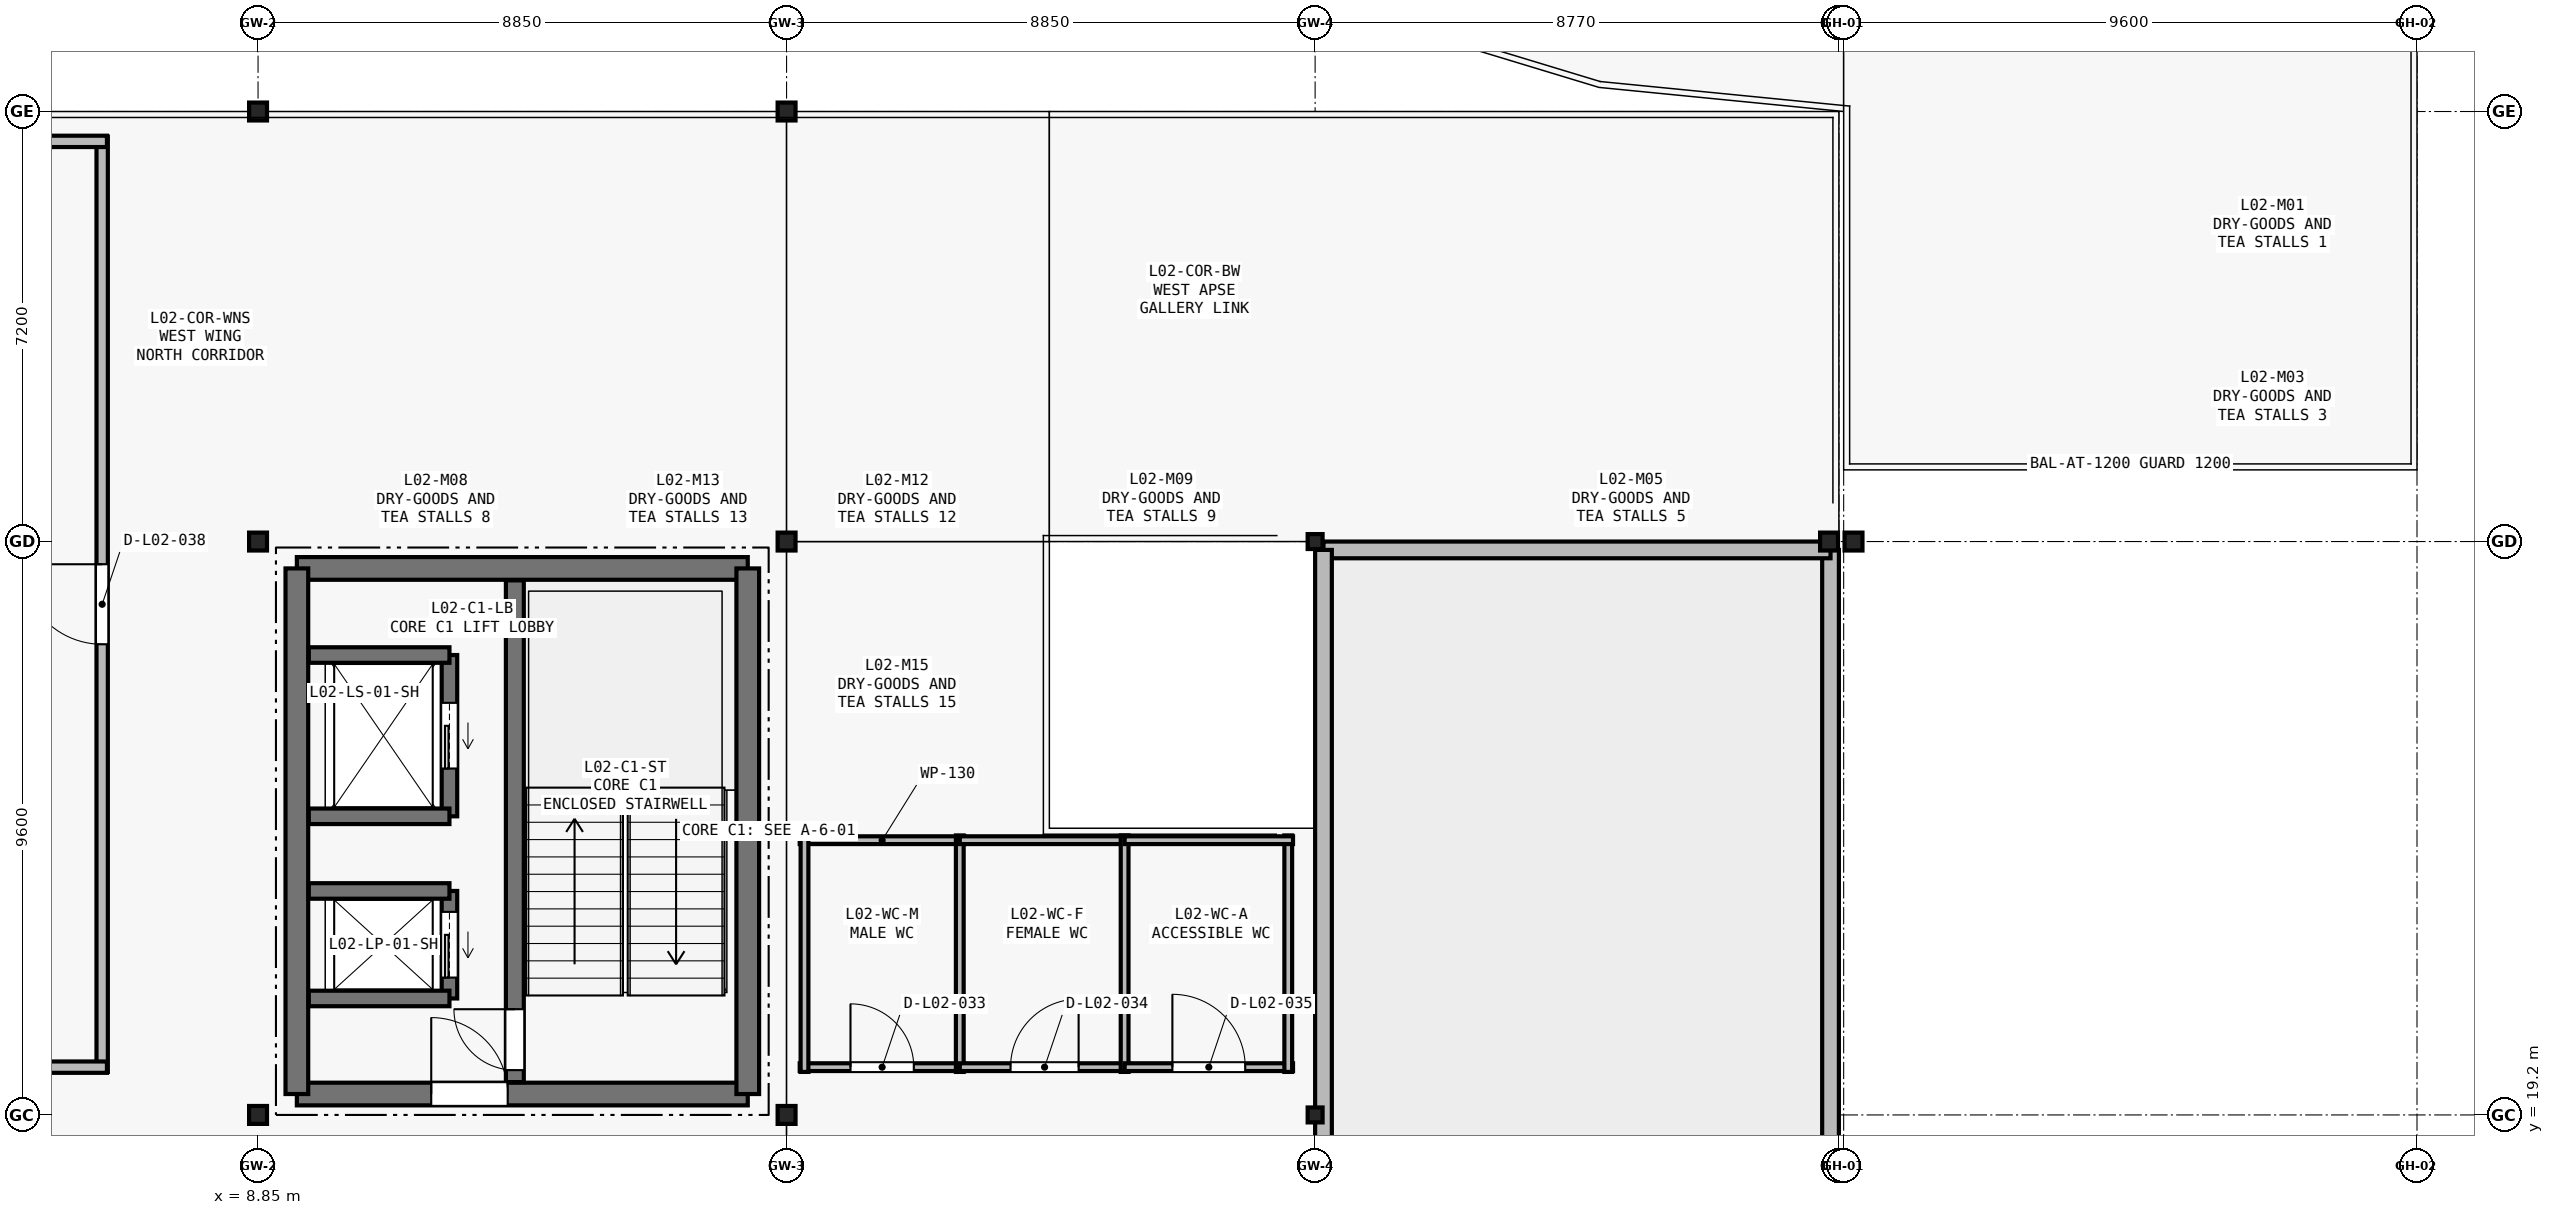
"""IFC4 building model, lengths in metres.
Left out: names, types, materials, properties, quantities, classifications, styles, units other than length and angle.
Written with IfcOpenShell. Run it as: python <this file> out.ifc"""

import sys

from ifc_helpers import new_model, si_unit, direction, frame, frame_2d, origin, origin_2d, place, context, subcontext, project, spatial, rectangle, i_section, extrude, element, fill, save


model = new_model("IFC4")
c1 = context("Model", 3, precision=1e-05, world=origin(), true_north=direction((0.0, 1.0)))
c2 = subcontext(c1, "Body", "Model", "MODEL_VIEW")
j1 = project(units=[si_unit("LENGTHUNIT", "METRE"), si_unit("PLANEANGLEUNIT", "RADIAN")], contexts=[c1])
p1 = place(None, origin())
s1 = spatial("IfcSite", under=j1, at=p1, CompositionType="ELEMENT")
p2 = place(p1, origin())
s2 = spatial("IfcBuilding", under=s1, at=p2, CompositionType="ELEMENT")
p3 = place(p2, frame((0.0, 0.0, 10.8)))
s3 = spatial("IfcBuildingStorey", under=s2, at=p3, CompositionType="ELEMENT", Elevation=10.8)
for number, where, z_axis, x_axis in (
    (1, (8.85, 19.2, 0.0), (0.0, 0.0, 1.0), (1.0, 0.0, 0.0)),
    (2, (8.85, 28.8, 0.0), (0.0, 0.0, 1.0), (1.0, 0.0, 0.0)),
    (3, (8.85, 36.0, 0.0), (0.0, 0.0, 1.0), (1.0, 0.0, 0.0)),
    (4, (17.7, 19.2, 0.0), (0.0, 0.0, 1.0), (1.0, 0.0, 0.0)),
    (5, (17.7, 28.8, 0.0), (0.0, 0.0, 1.0), (1.0, 0.0, 0.0)),
    (6, (17.7, 36.0, 0.0), (0.0, 0.0, 1.0), (1.0, 0.0, 0.0)),
):
    element("IfcColumn", number, at=place(p3, frame(where, z_axis=z_axis, x_axis=x_axis)), inside=s3, PredefinedType="COLUMN", context=c2, shape_type="SweptSolid", body=[
        extrude(i_section(OverallWidth=0.3, OverallDepth=0.3, WebThickness=0.01, FlangeThickness=0.015, FilletRadius=0.018, at=origin_2d()), origin(), (0.0, 0.0, 1.0), 4.2),
    ])
for number, where, z_axis, x_axis in (
    (7, (26.55, 19.2, 0.0), (0.0, 0.0, 1.0), (1.0, 0.0, 0.0)),
    (8, (26.55, 28.8, 0.0), (0.0, 0.0, 1.0), (1.0, 0.0, 0.0)),
):
    element("IfcColumn", number, at=place(p3, frame(where, z_axis=z_axis, x_axis=x_axis)), inside=s3, PredefinedType="COLUMN", context=c2, shape_type="SweptSolid", body=[
        extrude(i_section(OverallWidth=0.25, OverallDepth=0.25, WebThickness=0.009, FlangeThickness=0.014, FilletRadius=0.016, at=origin_2d()), origin(), (0.0, 0.0, 1.0), 4.2),
    ])
for number, where, z_axis, x_axis in (
    (9, (35.155, 28.8, 0.0), (0.0, 0.0, 1.0), (1.0, 0.0, 0.0)),
    (10, (35.565, 28.8, 0.0), (0.0, 0.0, 1.0), (1.0, 0.0, 0.0)),
):
    element("IfcColumn", number, at=place(p3, frame(where, z_axis=z_axis, x_axis=x_axis)), inside=s3, PredefinedType="COLUMN", context=c2, shape_type="SweptSolid", body=[
        extrude(i_section(OverallWidth=0.3, OverallDepth=0.3, WebThickness=0.01, FlangeThickness=0.015, FilletRadius=0.018, at=origin_2d()), origin(), (0.0, 0.0, 1.0), 4.2),
    ])
p4 = place(p3, frame((35.18, 0.14, 0.01), z_axis=(0.0, 0.0, 1.0), x_axis=(0.0, 1.0, 0.0)))
e11 = element("IfcWall", 11, at=p4, inside=s3, PredefinedType="PARAPET", context=c2, shape_type="SweptSolid", body=[
    extrude(rectangle(XDim=28.52, YDim=0.28, at=frame_2d((14.26, 0.0))), origin(), (0.0, 0.0, 1.0), 1.15),
])
p5 = place(p3, frame((35.18, 28.66, 0.01), z_axis=(0.0, 0.0, 1.0), x_axis=(-1.0, 0.0, 0.0)))
e12 = element("IfcWall", 12, at=p5, inside=s3, PredefinedType="PARAPET", context=c2, shape_type="SweptSolid", body=[
    extrude(rectangle(XDim=8.49, YDim=0.28, at=frame_2d((4.245, 0.0))), origin(), (0.0, 0.0, 1.0), 1.15),
])
p6 = place(p3, frame((26.69, 28.66, 0.01), z_axis=(0.0, 0.0, 1.0), x_axis=(0.0, -1.0, 0.0)))
e13 = element("IfcWall", 13, at=p6, inside=s3, PredefinedType="PARAPET", context=c2, shape_type="SweptSolid", body=[
    extrude(rectangle(XDim=28.52, YDim=0.28, at=frame_2d((14.26, 0.0))), origin(), (0.0, 0.0, 1.0), 1.15),
])
p7 = place(p3, frame((9.5, 19.55, 0.0), z_axis=(0.0, 0.0, 1.0), x_axis=(1.0, 0.0, 0.0)))
e14 = element("IfcWall", 14, at=p7, inside=s3, PredefinedType="SHEAR", context=c2, shape_type="SweptSolid", body=[
    extrude(rectangle(XDim=7.55, YDim=0.38, at=frame_2d((3.775, 0.0))), origin(), (0.0, 0.0, 1.0), 4.2),
])
p8 = place(p7, frame((2.25, 0.0, 0.0)))
e15 = element("IfcOpeningElement", 15, at=p8, cuts=e14, PredefinedType="OPENING", context=c2, shape_type="SweptSolid", body=[
    extrude(rectangle(XDim=1.28, YDim=2.15, at=frame_2d((0.64, 1.075))), frame((0.0, 0.2, 0.0), z_axis=(0.0, -1.0, 0.0), x_axis=(1.0, 0.0, 0.0)), (0.0, 0.0, 1.0), 0.4),
])
p9 = place(p3, frame((17.05, 28.35, 0.0), z_axis=(0.0, 0.0, 1.0), x_axis=(-1.0, 0.0, 0.0)))
e16 = element("IfcWall", 16, at=p9, inside=s3, PredefinedType="SHEAR", context=c2, shape_type="SweptSolid", body=[
    extrude(rectangle(XDim=7.55, YDim=0.38, at=frame_2d((3.775, 0.0))), origin(), (0.0, 0.0, 1.0), 4.2),
])
for number, where, z_axis, x_axis in (
    (17, (9.5, 28.35, 0.0), (0.0, 0.0, 1.0), (0.0, -1.0, 0.0)),
    (18, (17.05, 19.55, 0.0), (0.0, 0.0, 1.0), (0.0, 1.0, 0.0)),
):
    element("IfcWall", number, at=place(p3, frame(where, z_axis=z_axis, x_axis=x_axis)), inside=s3, PredefinedType="SHEAR", context=c2, shape_type="SweptSolid", body=[
        extrude(rectangle(XDim=8.8, YDim=0.38, at=frame_2d((4.4, 0.0))), origin(), (0.0, 0.0, 1.0), 4.2),
    ])
p10 = place(p3, frame((13.15, 19.75, 0.0), z_axis=(0.0, 0.0, 1.0), x_axis=(0.0, 1.0, 0.0)))
e19 = element("IfcWall", 19, at=p10, inside=s3, PredefinedType="SHEAR", context=c2, shape_type="SweptSolid", body=[
    extrude(rectangle(XDim=8.4, YDim=0.3, at=frame_2d((4.2, 0.0))), origin(), (0.0, 0.0, 1.0), 4.2),
])
p11 = place(p10, frame((0.2, 0.0, 0.0)))
e20 = element("IfcOpeningElement", 20, at=p11, cuts=e19, PredefinedType="OPENING", context=c2, shape_type="SweptSolid", body=[
    extrude(rectangle(XDim=1.02, YDim=2.1, at=frame_2d((0.51, 1.05))), frame((0.0, 0.16, 0.0), z_axis=(0.0, -1.0, 0.0), x_axis=(1.0, 0.0, 0.0)), (0.0, 0.0, 1.0), 0.32),
])
p12 = place(p3, frame((12.055, 21.15, 0.0), z_axis=(0.0, 0.0, 1.0), x_axis=(0.0, 1.0, 0.0)))
e21 = element("IfcWall", 21, at=p12, inside=s3, PredefinedType="SHEAR", context=c2, shape_type="SweptSolid", body=[
    extrude(rectangle(XDim=1.8, YDim=0.26, at=frame_2d((0.9, 0.0))), origin(), (0.0, 0.0, 1.0), 4.2),
])
p13 = place(p12, frame((0.35, 0.0, 0.0)))
e22 = element("IfcOpeningElement", 22, at=p13, cuts=e21, PredefinedType="OPENING", context=c2, shape_type="SweptSolid", body=[
    extrude(rectangle(XDim=1.1, YDim=2.15, at=frame_2d((0.55, 1.075))), frame((0.0, 0.14, 0.0), z_axis=(0.0, -1.0, 0.0), x_axis=(1.0, 0.0, 0.0)), (0.0, 0.0, 1.0), 0.28),
])
for number, where, z_axis, x_axis in (
    (23, (9.7, 21.15, 0.0), (0.0, 0.0, 1.0), (1.0, 0.0, 0.0)),
    (24, (9.7, 22.95, 0.0), (0.0, 0.0, 1.0), (1.0, 0.0, 0.0)),
):
    element("IfcWall", number, at=place(p3, frame(where, z_axis=z_axis, x_axis=x_axis)), inside=s3, PredefinedType="SHEAR", context=c2, shape_type="SweptSolid", body=[
        extrude(rectangle(XDim=2.355, YDim=0.26, at=frame_2d((1.177, 0.0))), origin(), (0.0, 0.0, 1.0), 4.2),
    ])
p14 = place(p3, frame((12.055, 24.2, 0.0), z_axis=(0.0, 0.0, 1.0), x_axis=(0.0, 1.0, 0.0)))
e25 = element("IfcWall", 25, at=p14, inside=s3, PredefinedType="SHEAR", context=c2, shape_type="SweptSolid", body=[
    extrude(rectangle(XDim=2.7, YDim=0.26, at=frame_2d((1.35, 0.0))), origin(), (0.0, 0.0, 1.0), 4.2),
])
p15 = place(p14, frame((0.8, 0.0, 0.0)))
e26 = element("IfcOpeningElement", 26, at=p15, cuts=e25, PredefinedType="OPENING", context=c2, shape_type="SweptSolid", body=[
    extrude(rectangle(XDim=1.1, YDim=2.15, at=frame_2d((0.55, 1.075))), frame((0.0, 0.14, 0.0), z_axis=(0.0, -1.0, 0.0), x_axis=(1.0, 0.0, 0.0)), (0.0, 0.0, 1.0), 0.28),
])
for number, where, z_axis, x_axis in (
    (27, (9.7, 24.2, 0.0), (0.0, 0.0, 1.0), (1.0, 0.0, 0.0)),
    (28, (9.7, 26.9, 0.0), (0.0, 0.0, 1.0), (1.0, 0.0, 0.0)),
):
    element("IfcWall", number, at=place(p3, frame(where, z_axis=z_axis, x_axis=x_axis)), inside=s3, PredefinedType="SHEAR", context=c2, shape_type="SweptSolid", body=[
        extrude(rectangle(XDim=2.355, YDim=0.26, at=frame_2d((1.177, 0.0))), origin(), (0.0, 0.0, 1.0), 4.2),
    ])
p16 = place(p3, frame((17.92, 20.0, 0.0), z_axis=(0.0, 0.0, 1.0), x_axis=(1.0, 0.0, 0.0)))
e29 = element("IfcWall", 29, at=p16, inside=s3, PredefinedType="PARTITIONING", context=c2, shape_type="SweptSolid", body=[
    extrude(rectangle(XDim=2.76, YDim=0.13, at=frame_2d((1.38, 0.0))), origin(), (0.0, 0.0, 1.0), 3.72),
])
p17 = place(p16, frame((0.85, 0.0, 0.0)))
e30 = element("IfcOpeningElement", 30, at=p17, cuts=e29, PredefinedType="OPENING", context=c2, shape_type="SweptSolid", body=[
    extrude(rectangle(XDim=1.06, YDim=2.36, at=frame_2d((0.53, 1.18))), frame((0.0, 0.075, 0.0), z_axis=(0.0, -1.0, 0.0), x_axis=(1.0, 0.0, 0.0)), (0.0, 0.0, 1.0), 0.15),
])
p18 = place(p3, frame((20.68, 23.8, 0.0), z_axis=(0.0, 0.0, 1.0), x_axis=(-1.0, 0.0, 0.0)))
e31 = element("IfcWall", 31, at=p18, inside=s3, PredefinedType="PARTITIONING", context=c2, shape_type="SweptSolid", body=[
    extrude(rectangle(XDim=2.76, YDim=0.13, at=frame_2d((1.38, 0.0))), origin(), (0.0, 0.0, 1.0), 3.72),
])
p19 = place(p3, frame((20.6, 19.92, 0.0), z_axis=(0.0, 0.0, 1.0), x_axis=(0.0, 1.0, 0.0)))
e32 = element("IfcWall", 32, at=p19, inside=s3, PredefinedType="PARTITIONING", context=c2, shape_type="SweptSolid", body=[
    extrude(rectangle(XDim=3.96, YDim=0.13, at=frame_2d((1.98, 0.0))), origin(), (0.0, 0.0, 1.0), 3.565),
])
p20 = place(p3, frame((18.0, 23.88, 0.0), z_axis=(0.0, 0.0, 1.0), x_axis=(0.0, -1.0, 0.0)))
e33 = element("IfcWall", 33, at=p20, inside=s3, PredefinedType="PARTITIONING", context=c2, shape_type="SweptSolid", body=[
    extrude(rectangle(XDim=3.96, YDim=0.13, at=frame_2d((1.98, 0.0))), origin(), (0.0, 0.0, 1.0), 3.72),
])
p21 = place(p3, frame((20.6, 20.0, 0.0), z_axis=(0.0, 0.0, 1.0), x_axis=(1.0, 0.0, 0.0)))
e34 = element("IfcWall", 34, at=p21, inside=s3, PredefinedType="PARTITIONING", context=c2, shape_type="SweptSolid", body=[
    extrude(rectangle(XDim=2.84, YDim=0.13, at=frame_2d((1.42, 0.0))), origin(), (0.0, 0.0, 1.0), 3.72),
])
p22 = place(p21, frame((0.85, 0.0, 0.0)))
e35 = element("IfcOpeningElement", 35, at=p22, cuts=e34, PredefinedType="OPENING", context=c2, shape_type="SweptSolid", body=[
    extrude(rectangle(XDim=1.14, YDim=2.36, at=frame_2d((0.57, 1.18))), frame((0.0, 0.075, 0.0), z_axis=(0.0, -1.0, 0.0), x_axis=(1.0, 0.0, 0.0)), (0.0, 0.0, 1.0), 0.15),
])
p23 = place(p3, frame((23.44, 23.8, 0.0), z_axis=(0.0, 0.0, 1.0), x_axis=(-1.0, 0.0, 0.0)))
e36 = element("IfcWall", 36, at=p23, inside=s3, PredefinedType="PARTITIONING", context=c2, shape_type="SweptSolid", body=[
    extrude(rectangle(XDim=2.84, YDim=0.13, at=frame_2d((1.42, 0.0))), origin(), (0.0, 0.0, 1.0), 3.72),
])
p24 = place(p3, frame((23.36, 19.92, 0.0), z_axis=(0.0, 0.0, 1.0), x_axis=(0.0, 1.0, 0.0)))
e37 = element("IfcWall", 37, at=p24, inside=s3, PredefinedType="PARTITIONING", context=c2, shape_type="SweptSolid", body=[
    extrude(rectangle(XDim=3.96, YDim=0.13, at=frame_2d((1.98, 0.0))), origin(), (0.0, 0.0, 1.0), 3.72),
])
p25 = place(p3, frame((23.36, 20.0, 0.0), z_axis=(0.0, 0.0, 1.0), x_axis=(1.0, 0.0, 0.0)))
e38 = element("IfcWall", 38, at=p25, inside=s3, PredefinedType="PARTITIONING", context=c2, shape_type="SweptSolid", body=[
    extrude(rectangle(XDim=2.82, YDim=0.13, at=frame_2d((1.41, 0.0))), origin(), (0.0, 0.0, 1.0), 3.72),
])
p26 = place(p25, frame((0.8, 0.0, 0.0)))
e39 = element("IfcOpeningElement", 39, at=p26, cuts=e38, PredefinedType="OPENING", context=c2, shape_type="SweptSolid", body=[
    extrude(rectangle(XDim=1.22, YDim=2.36, at=frame_2d((0.61, 1.18))), frame((0.0, 0.075, 0.0), z_axis=(0.0, -1.0, 0.0), x_axis=(1.0, 0.0, 0.0)), (0.0, 0.0, 1.0), 0.15),
])
p27 = place(p3, frame((26.1, 19.92, 0.0), z_axis=(0.0, 0.0, 1.0), x_axis=(0.0, 1.0, 0.0)))
e40 = element("IfcWall", 40, at=p27, inside=s3, PredefinedType="PARTITIONING", context=c2, shape_type="SweptSolid", body=[
    extrude(rectangle(XDim=3.96, YDim=0.13, at=frame_2d((1.98, 0.0))), origin(), (0.0, 0.0, 1.0), 3.72),
])
p28 = place(p3, frame((26.18, 23.8, 0.0), z_axis=(0.0, 0.0, 1.0), x_axis=(-1.0, 0.0, 0.0)))
e41 = element("IfcWall", 41, at=p28, inside=s3, PredefinedType="PARTITIONING", context=c2, shape_type="SweptSolid", body=[
    extrude(rectangle(XDim=2.82, YDim=0.13, at=frame_2d((1.41, 0.0))), origin(), (0.0, 0.0, 1.0), 3.72),
])
p29 = place(p3, frame((6.24, 19.92, 0.0), z_axis=(0.0, 0.0, 1.0), x_axis=(0.0, 1.0, 0.0)))
e42 = element("IfcWall", 42, at=p29, inside=s3, PredefinedType="PARTITIONING", context=c2, shape_type="SweptSolid", body=[
    extrude(rectangle(XDim=15.66, YDim=0.19, at=frame_2d((7.83, 0.0))), origin(), (0.0, 0.0, 1.0), 3.72),
])
p30 = place(p29, frame((7.16, 0.0, 0.0)))
e43 = element("IfcOpeningElement", 43, at=p30, cuts=e42, PredefinedType="OPENING", context=c2, shape_type="SweptSolid", body=[
    extrude(rectangle(XDim=1.34, YDim=2.26, at=frame_2d((0.67, 1.13))), frame((0.0, 0.105, 0.0), z_axis=(0.0, -1.0, 0.0), x_axis=(1.0, 0.0, 0.0)), (0.0, 0.0, 1.0), 0.21),
])
for number, where, z_axis, x_axis in (
    (44, (0.2, 20.0, 0.0), (0.0, 0.0, 1.0), (1.0, 0.0, 0.0)),
    (45, (6.32, 35.5, 0.0), (0.0, 0.0, 1.0), (-1.0, 0.0, 0.0)),
):
    element("IfcWall", number, at=place(p3, frame(where, z_axis=z_axis, x_axis=x_axis)), inside=s3, PredefinedType="PARTITIONING", context=c2, shape_type="SweptSolid", body=[
        extrude(rectangle(XDim=6.12, YDim=0.19, at=frame_2d((3.06, 0.0))), origin(), (0.0, 0.0, 1.0), 3.72),
    ])
p31 = place(p8, origin())
e46 = element("IfcDoor", 46, at=p31, inside=s3, OperationType="SINGLE_SWING_LEFT", PredefinedType="DOOR", context=c2, shape_type="SweptSolid", body=[
    extrude(rectangle(XDim=1.28, YDim=2.15, at=frame_2d((0.64, 1.075))), frame((0.0, 0.025, 0.0), z_axis=(0.0, -1.0, 0.0), x_axis=(1.0, 0.0, 0.0)), (0.0, 0.0, 1.0), 0.05),
])
fill(e15, e46)
p32 = place(p11, origin())
e47 = element("IfcDoor", 47, at=p32, inside=s3, OperationType="SINGLE_SWING_RIGHT", PredefinedType="DOOR", context=c2, shape_type="SweptSolid", body=[
    extrude(rectangle(XDim=1.02, YDim=2.1, at=frame_2d((0.51, 1.05))), frame((0.0, 0.025, 0.0), z_axis=(0.0, -1.0, 0.0), x_axis=(1.0, 0.0, 0.0)), (0.0, 0.0, 1.0), 0.05),
])
fill(e20, e47)
p33 = place(p13, origin())
e48 = element("IfcDoor", 48, at=p33, inside=s3, OperationType="SLIDING_TO_LEFT", PredefinedType="DOOR", context=c2, shape_type="SweptSolid", body=[
    extrude(rectangle(XDim=1.1, YDim=2.15, at=frame_2d((0.55, 1.075))), frame((0.0, 0.025, 0.0), z_axis=(0.0, -1.0, 0.0), x_axis=(1.0, 0.0, 0.0)), (0.0, 0.0, 1.0), 0.05),
])
fill(e22, e48)
p34 = place(p15, origin())
e49 = element("IfcDoor", 49, at=p34, inside=s3, OperationType="SLIDING_TO_LEFT", PredefinedType="DOOR", context=c2, shape_type="SweptSolid", body=[
    extrude(rectangle(XDim=1.1, YDim=2.15, at=frame_2d((0.55, 1.075))), frame((0.0, 0.025, 0.0), z_axis=(0.0, -1.0, 0.0), x_axis=(1.0, 0.0, 0.0)), (0.0, 0.0, 1.0), 0.05),
])
fill(e26, e49)
p35 = place(p17, origin())
e50 = element("IfcDoor", 50, at=p35, inside=s3, OperationType="SINGLE_SWING_LEFT", PredefinedType="DOOR", context=c2, shape_type="SweptSolid", body=[
    extrude(rectangle(XDim=1.06, YDim=2.36, at=frame_2d((0.53, 1.18))), frame((0.0, 0.025, 0.0), z_axis=(0.0, -1.0, 0.0), x_axis=(1.0, 0.0, 0.0)), (0.0, 0.0, 1.0), 0.05),
])
fill(e30, e50)
p36 = place(p22, origin())
e51 = element("IfcDoor", 51, at=p36, inside=s3, OperationType="SINGLE_SWING_RIGHT", PredefinedType="DOOR", context=c2, shape_type="SweptSolid", body=[
    extrude(rectangle(XDim=1.14, YDim=2.36, at=frame_2d((0.57, 1.18))), frame((0.0, 0.025, 0.0), z_axis=(0.0, -1.0, 0.0), x_axis=(1.0, 0.0, 0.0)), (0.0, 0.0, 1.0), 0.05),
])
fill(e35, e51)
p37 = place(p26, origin())
e52 = element("IfcDoor", 52, at=p37, inside=s3, OperationType="SINGLE_SWING_LEFT", PredefinedType="DOOR", context=c2, shape_type="SweptSolid", body=[
    extrude(rectangle(XDim=1.22, YDim=2.36, at=frame_2d((0.61, 1.18))), frame((0.0, 0.025, 0.0), z_axis=(0.0, -1.0, 0.0), x_axis=(1.0, 0.0, 0.0)), (0.0, 0.0, 1.0), 0.05),
])
fill(e39, e52)
p38 = place(p30, origin())
e53 = element("IfcDoor", 53, at=p38, inside=s3, OperationType="SINGLE_SWING_RIGHT", PredefinedType="DOOR", context=c2, shape_type="SweptSolid", body=[
    extrude(rectangle(XDim=1.34, YDim=2.26, at=frame_2d((0.67, 1.13))), frame((0.0, 0.025, 0.0), z_axis=(0.0, -1.0, 0.0), x_axis=(1.0, 0.0, 0.0)), (0.0, 0.0, 1.0), 0.05),
])
fill(e43, e53)
save(model, sys.argv[1])
